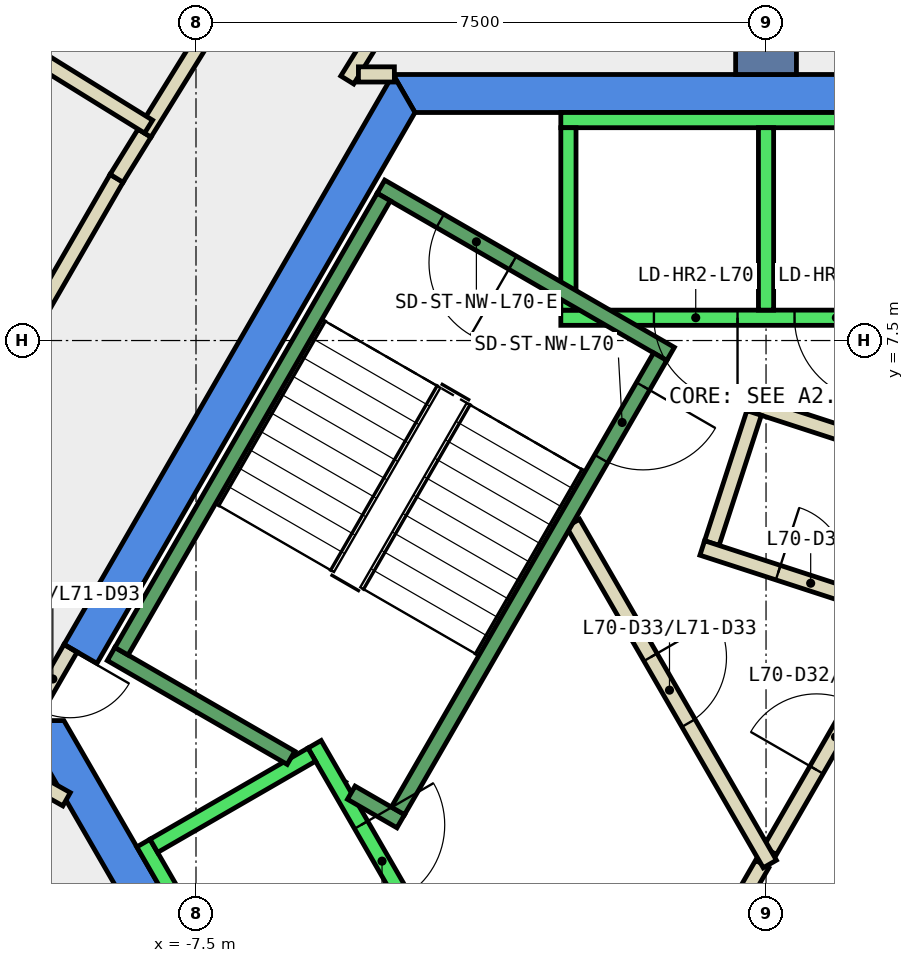
"""IFC4 building model, lengths in metres.
Left out: names, types, materials, properties, quantities, classifications, styles, units other than length and angle.
Written with IfcOpenShell. Run it as: python <this file> out.ifc"""

import sys

from ifc_helpers import new_model, si_unit, direction, frame, frame_2d, origin, place, context, subcontext, project, spatial, polyline, rectangle, outline, extrude, element, fill, save


model = new_model("IFC4")
c1 = context("Model", 3, precision=1e-05, world=origin(), true_north=direction((0.0, 1.0)))
c2 = subcontext(c1, "Body", "Model", "MODEL_VIEW")
j1 = project(units=[si_unit("LENGTHUNIT", "METRE"), si_unit("PLANEANGLEUNIT", "RADIAN")], contexts=[c1])
p1 = place(None, origin())
s1 = spatial("IfcSite", under=j1, at=p1, CompositionType="ELEMENT")
p2 = place(p1, origin())
s2 = spatial("IfcBuilding", under=s1, at=p2, CompositionType="ELEMENT")
p3 = place(p2, frame((0.0, 0.0, 300.8)))
s3 = spatial("IfcBuildingStorey", under=s2, at=p3, CompositionType="ELEMENT", Elevation=300.8)
p4 = place(p3, frame((0.0, 0.0, -0.34)))
e1 = element("IfcWall", 1, at=p4, inside=s3, PredefinedType="SHEAR", context=c2, shape_type="SweptSolid", body=[
    extrude(outline(polyline([(4.907, 11.0), (-4.907, 11.0), (-4.619, 10.5), (4.619, 10.5), (4.907, 11.0)])), origin(), (0.0, 0.0, 1.0), 3.6),
])
p5 = place(p3, frame((0.0, 0.0, -0.34)))
e2 = element("IfcWall", 2, at=p5, inside=s3, PredefinedType="SHEAR", context=c2, shape_type="SweptSolid", body=[
    extrude(outline(polyline([(-9.236, 3.502), (-8.803, 3.253), (-4.619, 10.5), (-4.907, 11.0), (-9.236, 3.502)])), origin(), (0.0, 0.0, 1.0), 3.6),
])
p6 = place(p3, frame((0.0, 0.0, -0.34)))
e3 = element("IfcWall", 3, at=p6, inside=s3, PredefinedType="SHEAR", context=c2, shape_type="SweptSolid", body=[
    extrude(outline(polyline([(-9.815, 2.5), (-4.907, -6.0), (-4.619, -5.5), (-9.238, 2.5), (-9.815, 2.5)])), origin(), (0.0, 0.0, 1.0), 3.6),
])
p7 = place(p3, frame((0.0, 11.0, -0.34), z_axis=(0.0, 0.0, 1.0), x_axis=(0.0, 1.0, 0.0)))
e4 = element("IfcWall", 4, at=p7, inside=s3, PredefinedType="SHEAR", context=c2, shape_type="SweptSolid", body=[
    extrude(rectangle(XDim=9.0, YDim=0.8, at=frame_2d((4.5, 0.0))), origin(), (0.0, 0.0, 1.0), 3.6),
])
p8 = place(p3, frame((2.06, 5.931, 0.0), z_axis=(0.0, 0.0, 1.0), x_axis=(-0.95092855133, 0.309410552932, 0.0)))
e5 = element("IfcWall", 5, at=p8, inside=s3, PredefinedType="PARTITIONING", context=c2, shape_type="SweptSolid", body=[
    extrude(rectangle(XDim=2.399, YDim=0.2, at=frame_2d((1.199, 0.0))), origin(), (0.0, 0.0, 1.0), 3.26),
])
p9 = place(p3, frame((-0.157, 6.547, 0.0), z_axis=(0.0, 0.0, 1.0), x_axis=(-0.308813127339, -0.951122732555, 0.0)))
e6 = element("IfcWall", 6, at=p9, inside=s3, PredefinedType="PARTITIONING", context=c2, shape_type="SweptSolid", body=[
    extrude(rectangle(XDim=1.8, YDim=0.2, at=frame_2d((0.9, 0.0))), origin(), (0.0, 0.0, 1.0), 3.26),
])
p10 = place(p3, frame((-0.839, 4.771, 0.0), z_axis=(0.0, 0.0, 1.0), x_axis=(0.950961084355, -0.309310549515, 0.0)))
e7 = element("IfcWall", 7, at=p10, inside=s3, PredefinedType="PARTITIONING", context=c2, shape_type="SweptSolid", body=[
    extrude(rectangle(XDim=3.0, YDim=0.2, at=frame_2d((1.5, 0.0))), origin(), (0.0, 0.0, 1.0), 3.26),
])
p11 = place(p10, frame((1.05, 0.0, 0.0)))
e8 = element("IfcOpeningElement", 8, at=p11, cuts=e7, PredefinedType="OPENING", context=c2, shape_type="SweptSolid", body=[
    extrude(rectangle(XDim=0.9, YDim=2.1, at=frame_2d((0.45, 1.05))), frame((0.0, 0.11, 0.0), z_axis=(0.0, -1.0, 0.0), x_axis=(1.0, 0.0, 0.0)), (0.0, 0.0, 1.0), 0.22),
])
p12 = place(p3, frame((-2.969, 15.033, 0.0), z_axis=(0.0, 0.0, 1.0), x_axis=(-0.526330241425, -0.85028023437, 0.0)))
e9 = element("IfcWall", 9, at=p12, inside=s3, PredefinedType="PARTITIONING", context=c2, shape_type="SweptSolid", body=[
    extrude(rectangle(XDim=4.828, YDim=0.2, at=frame_2d((2.414, 0.0))), origin(), (0.0, 0.0, 1.0), 3.26),
])
p13 = place(p12, frame((1.514, 0.0, 0.0)))
e10 = element("IfcOpeningElement", 10, at=p13, cuts=e9, PredefinedType="OPENING", context=c2, shape_type="SweptSolid", body=[
    extrude(rectangle(XDim=1.8, YDim=2.1, at=frame_2d((0.9, 1.05))), frame((0.0, 0.11, 0.0), z_axis=(0.0, -1.0, 0.0), x_axis=(1.0, 0.0, 0.0)), (0.0, 0.0, 1.0), 0.22),
])
p14 = place(p3, frame((-5.363, 11.001, 0.0), z_axis=(0.0, 0.0, 1.0), x_axis=(1.0, 0.0, 0.0)))
e11 = element("IfcWall", 11, at=p14, inside=s3, PredefinedType="PARTITIONING", context=c2, shape_type="SweptSolid", body=[
    extrude(rectangle(XDim=0.473, YDim=0.2, at=frame_2d((0.237, 0.0))), origin(), (0.0, 0.0, 1.0), 3.26),
])
p15 = place(p3, frame((-9.203, 1.465, 0.0), z_axis=(0.0, 0.0, 1.0), x_axis=(-0.872243753731, 0.489071399775, 0.0)))
e12 = element("IfcWall", 12, at=p15, inside=s3, PredefinedType="PARTITIONING", context=c2, shape_type="SweptSolid", body=[
    extrude(rectangle(XDim=1.715, YDim=0.2, at=frame_2d((0.858, 0.0))), origin(), (0.0, 0.0, 1.0), 3.26),
])
p16 = place(p3, frame((-10.543, 6.174, 0.0), z_axis=(0.0, 0.0, 1.0), x_axis=(0.50008212199, 0.86597798544, 0.0)))
e13 = element("IfcWall", 13, at=p16, inside=s3, PredefinedType="PARTITIONING", context=c2, shape_type="SweptSolid", body=[
    extrude(rectangle(XDim=3.995, YDim=0.2, at=frame_2d((1.998, 0.0))), origin(), (0.0, 0.0, 1.0), 3.26),
])
p17 = place(p3, frame((-8.545, 9.634, 0.0), z_axis=(0.0, 0.0, 1.0), x_axis=(0.52594604986, 0.85051793199, 0.0)))
e14 = element("IfcWall", 14, at=p17, inside=s3, PredefinedType="PARTITIONING", context=c2, shape_type="SweptSolid", body=[
    extrude(rectangle(XDim=0.699, YDim=0.2, at=frame_2d((0.35, 0.0))), origin(), (0.0, 0.0, 1.0), 3.26),
])
p18 = place(p3, frame((-8.177, 10.229, 0.0), z_axis=(0.0, 0.0, 1.0), x_axis=(0.526504295939, 0.850172468595, 0.0)))
e15 = element("IfcWall", 15, at=p18, inside=s3, PredefinedType="PARTITIONING", context=c2, shape_type="SweptSolid", body=[
    extrude(rectangle(XDim=3.2, YDim=0.2, at=frame_2d((1.6, 0.0))), origin(), (0.0, 0.0, 1.0), 3.26),
])
p19 = place(p3, frame((-0.982, -1.0, 0.0), z_axis=(0.0, 0.0, 1.0), x_axis=(0.50024047865, 0.865886518847, 0.0)))
e16 = element("IfcWall", 16, at=p19, inside=s3, PredefinedType="PARTITIONING", context=c2, shape_type="SweptSolid", body=[
    extrude(rectangle(XDim=1.863, YDim=0.2, at=frame_2d((0.931, 0.0))), origin(), (0.0, 0.0, 1.0), 3.26),
])
p20 = place(p3, frame((0.05, 0.787, 0.0), z_axis=(0.0, 0.0, 1.0), x_axis=(0.499954076797, 0.866051915934, 0.0)))
e17 = element("IfcWall", 17, at=p20, inside=s3, PredefinedType="PARTITIONING", context=c2, shape_type="SweptSolid", body=[
    extrude(rectangle(XDim=3.558, YDim=0.2, at=frame_2d((1.779, 0.0))), origin(), (0.0, 0.0, 1.0), 3.26),
])
p21 = place(p20, frame((1.229, 0.0, 0.0)))
e18 = element("IfcOpeningElement", 18, at=p21, cuts=e17, PredefinedType="OPENING", context=c2, shape_type="SweptSolid", body=[
    extrude(rectangle(XDim=1.0, YDim=2.1, at=frame_2d((0.5, 1.05))), frame((0.0, 0.11, 0.0), z_axis=(0.0, -1.0, 0.0), x_axis=(1.0, 0.0, 0.0)), (0.0, 0.0, 1.0), 0.22),
])
p22 = place(p3, frame((-2.54, 5.1, 0.0), z_axis=(0.0, 0.0, 1.0), x_axis=(0.499925051871, -0.866068670783, 0.0)))
e19 = element("IfcWall", 19, at=p22, inside=s3, PredefinedType="PARTITIONING", context=c2, shape_type="SweptSolid", body=[
    extrude(rectangle(XDim=5.181, YDim=0.2, at=frame_2d((2.59, 0.0))), origin(), (0.0, 0.0, 1.0), 3.26),
])
p23 = place(p22, frame((2.04, 0.0, 0.0)))
e20 = element("IfcOpeningElement", 20, at=p23, cuts=e19, PredefinedType="OPENING", context=c2, shape_type="SweptSolid", body=[
    extrude(rectangle(XDim=1.0, YDim=2.1, at=frame_2d((0.5, 1.05))), frame((0.0, 0.11, 0.0), z_axis=(0.0, -1.0, 0.0), x_axis=(1.0, 0.0, 0.0)), (0.0, 0.0, 1.0), 0.22),
])
p24 = place(p3, frame((-10.42, 11.736, 0.0), z_axis=(0.0, 0.0, 1.0), x_axis=(0.850124477172, -0.52658178217, 0.0)))
e21 = element("IfcWall", 21, at=p24, inside=s3, PredefinedType="PARTITIONING", context=c2, shape_type="SweptSolid", body=[
    extrude(rectangle(XDim=2.701, YDim=0.2, at=frame_2d((1.35, 0.0))), origin(), (0.0, 0.0, 1.0), 3.26),
])
p25 = place(p3, frame((-9.15, 3.452, 0.0), z_axis=(0.0, 0.0, 1.0), x_axis=(-0.500079945886, -0.865979242085, 0.0)))
e22 = element("IfcWall", 22, at=p25, inside=s3, PredefinedType="PARTITIONING", context=c2, shape_type="SweptSolid", body=[
    extrude(rectangle(XDim=0.926, YDim=0.2, at=frame_2d((0.463, 0.0))), origin(), (0.0, 0.0, 1.0), 2.4),
])
p26 = place(p25, frame((0.017, 0.0, 0.0)))
e23 = element("IfcOpeningElement", 23, at=p26, cuts=e22, PredefinedType="OPENING", context=c2, shape_type="SweptSolid", body=[
    extrude(rectangle(XDim=0.9, YDim=2.1, at=frame_2d((0.45, 1.05))), frame((0.0, 0.11, 0.0), z_axis=(0.0, -1.0, 0.0), x_axis=(1.0, 0.0, 0.0)), (0.0, 0.0, 1.0), 0.22),
])
p27 = place(p3, frame((2.7, 7.8, 0.0), z_axis=(0.0, 0.0, 1.0), x_axis=(-1.0, 0.0, 0.0)))
e24 = element("IfcWall", 24, at=p27, inside=s3, PredefinedType="STANDARD", context=c2, shape_type="SweptSolid", body=[
    extrude(rectangle(XDim=5.4, YDim=0.2, at=frame_2d((2.7, 0.0))), origin(), (0.0, 0.0, 1.0), 3.26),
])
p28 = place(p27, frame((1.225, 0.0, 0.0)))
e25 = element("IfcOpeningElement", 25, at=p28, cuts=e24, PredefinedType="OPENING", context=c2, shape_type="SweptSolid", body=[
    extrude(rectangle(XDim=1.1, YDim=2.1, at=frame_2d((0.55, 1.05))), frame((0.0, 0.11, 0.0), z_axis=(0.0, -1.0, 0.0), x_axis=(1.0, 0.0, 0.0)), (0.0, 0.0, 1.0), 0.22),
])
p29 = place(p27, frame((3.075, 0.0, 0.0)))
e26 = element("IfcOpeningElement", 26, at=p29, cuts=e24, PredefinedType="OPENING", context=c2, shape_type="SweptSolid", body=[
    extrude(rectangle(XDim=1.1, YDim=2.1, at=frame_2d((0.55, 1.05))), frame((0.0, 0.11, 0.0), z_axis=(0.0, -1.0, 0.0), x_axis=(1.0, 0.0, 0.0)), (0.0, 0.0, 1.0), 0.22),
])
p30 = place(p3, frame((2.7, 10.4, 0.0), z_axis=(0.0, 0.0, 1.0), x_axis=(-1.0, 0.0, 0.0)))
e27 = element("IfcWall", 27, at=p30, inside=s3, PredefinedType="STANDARD", context=c2, shape_type="SweptSolid", body=[
    extrude(rectangle(XDim=5.4, YDim=0.2, at=frame_2d((2.7, 0.0))), origin(), (0.0, 0.0, 1.0), 3.26),
])
for number, where, z_axis, x_axis in (
    (28, (0.0, 7.9, 0.0), (0.0, 0.0, 1.0), (0.0, 1.0, 0.0)),
    (29, (-2.6, 7.9, 0.0), (0.0, 0.0, 1.0), (0.0, 1.0, 0.0)),
):
    element("IfcWall", number, at=place(p3, frame(where, z_axis=z_axis, x_axis=x_axis)), inside=s3, PredefinedType="STANDARD", context=c2, shape_type="SweptSolid", body=[
        extrude(rectangle(XDim=2.4, YDim=0.2, at=frame_2d((1.2, 0.0))), origin(), (0.0, 0.0, 1.0), 3.26),
    ])
p31 = place(p3, frame((-5.94, 2.188, 0.0), z_axis=(0.0, 0.0, 1.0), x_axis=(0.500034260056, -0.866005622828, 0.0)))
e30 = element("IfcWall", 30, at=p31, inside=s3, PredefinedType="STANDARD", context=c2, shape_type="SweptSolid", body=[
    extrude(rectangle(XDim=5.399, YDim=0.2, at=frame_2d((2.7, 0.0))), origin(), (0.0, 0.0, 1.0), 3.26),
])
p32 = place(p31, frame((3.075, 0.0, 0.0)))
e31 = element("IfcOpeningElement", 31, at=p32, cuts=e30, PredefinedType="OPENING", context=c2, shape_type="SweptSolid", body=[
    extrude(rectangle(XDim=1.1, YDim=2.1, at=frame_2d((0.55, 1.05))), frame((0.0, 0.11, 0.0), z_axis=(0.0, -1.0, 0.0), x_axis=(1.0, 0.0, 0.0)), (0.0, 0.0, 1.0), 0.22),
])
p33 = place(p31, frame((1.225, 0.0, 0.0)))
e32 = element("IfcOpeningElement", 32, at=p33, cuts=e30, PredefinedType="OPENING", context=c2, shape_type="SweptSolid", body=[
    extrude(rectangle(XDim=1.1, YDim=2.1, at=frame_2d((0.55, 1.05))), frame((0.0, 0.11, 0.0), z_axis=(0.0, -1.0, 0.0), x_axis=(1.0, 0.0, 0.0)), (0.0, 0.0, 1.0), 0.22),
])
p34 = place(p3, frame((-8.192, 0.888, 0.0), z_axis=(0.0, 0.0, 1.0), x_axis=(0.500034260056, -0.866005622828, 0.0)))
e33 = element("IfcWall", 33, at=p34, inside=s3, PredefinedType="STANDARD", context=c2, shape_type="SweptSolid", body=[
    extrude(rectangle(XDim=5.399, YDim=0.2, at=frame_2d((2.7, 0.0))), origin(), (0.0, 0.0, 1.0), 3.26),
])
p35 = place(p3, frame((-5.977, 2.052, 0.0), z_axis=(0.0, 0.0, 1.0), x_axis=(-0.865973769406, -0.500089422704, 0.0)))
e34 = element("IfcWall", 34, at=p35, inside=s3, PredefinedType="STANDARD", context=c2, shape_type="SweptSolid", body=[
    extrude(rectangle(XDim=2.399, YDim=0.2, at=frame_2d((1.2, 0.0))), origin(), (0.0, 0.0, 1.0), 3.26),
])
p36 = place(p3, frame((-1.256, 7.324, 0.0), z_axis=(0.0, 0.0, 1.0), x_axis=(-0.866046073146, 0.499964197906, 0.0)))
e35 = element("IfcWall", 35, at=p36, inside=s3, PredefinedType="STANDARD", context=c2, shape_type="SweptSolid", body=[
    extrude(rectangle(XDim=4.4, YDim=0.2, at=frame_2d((2.2, 0.0))), origin(), (0.0, 0.0, 1.0), 3.26),
])
p37 = place(p36, frame((2.4, 0.0, 0.0)))
e36 = element("IfcOpeningElement", 36, at=p37, cuts=e35, PredefinedType="OPENING", context=c2, shape_type="SweptSolid", body=[
    extrude(rectangle(XDim=1.1, YDim=2.2, at=frame_2d((0.55, 1.1))), frame((0.0, 0.11, 0.0), z_axis=(0.0, -1.0, 0.0), x_axis=(1.0, 0.0, 0.0)), (0.0, 0.0, 1.0), 0.22),
])
p38 = place(p3, frame((-6.25, 2.01, 0.0), z_axis=(0.0, 0.0, 1.0), x_axis=(-0.86611865017, 0.499838457731, 0.0)))
e37 = element("IfcWall", 37, at=p38, inside=s3, PredefinedType="STANDARD", context=c2, shape_type="SweptSolid", body=[
    extrude(rectangle(XDim=2.733, YDim=0.2, at=frame_2d((1.366, 0.0))), origin(), (0.0, 0.0, 1.0), 3.26),
])
p39 = place(p3, frame((-4.806, 1.176, 0.0), z_axis=(0.0, 0.0, 1.0), x_axis=(-0.866558586415, 0.499075361355, 0.0)))
e38 = element("IfcWall", 38, at=p39, inside=s3, PredefinedType="STANDARD", context=c2, shape_type="SweptSolid", body=[
    extrude(rectangle(XDim=0.751, YDim=0.2, at=frame_2d((0.376, 0.0))), origin(), (0.0, 0.0, 1.0), 3.26),
])
p40 = place(p3, frame((-1.393, 7.288, 0.0), z_axis=(0.0, 0.0, 1.0), x_axis=(-0.499963383562, -0.866046543262, 0.0)))
e39 = element("IfcWall", 39, at=p40, inside=s3, PredefinedType="STANDARD", context=c2, shape_type="SweptSolid", body=[
    extrude(rectangle(XDim=6.9, YDim=0.2, at=frame_2d((3.45, 0.0))), origin(), (0.0, 0.0, 1.0), 3.26),
])
p41 = place(p40, frame((0.45, 0.0, 0.0)))
e40 = element("IfcOpeningElement", 40, at=p41, cuts=e39, PredefinedType="OPENING", context=c2, shape_type="SweptSolid", body=[
    extrude(rectangle(XDim=1.1, YDim=2.2, at=frame_2d((0.55, 1.1))), frame((0.0, 0.11, 0.0), z_axis=(0.0, -1.0, 0.0), x_axis=(1.0, 0.0, 0.0)), (0.0, 0.0, 1.0), 0.22),
])
p42 = place(p3, frame((-5.03, 9.388, 0.0), z_axis=(0.0, 0.0, 1.0), x_axis=(-0.499978703459, -0.866037698999, 0.0)))
e41 = element("IfcWall", 41, at=p42, inside=s3, PredefinedType="STANDARD", context=c2, shape_type="SweptSolid", body=[
    extrude(rectangle(XDim=6.9, YDim=0.2, at=frame_2d((3.45, 0.0))), origin(), (0.0, 0.0, 1.0), 3.26),
])
p43 = place(p21, origin())
e42 = element("IfcDoor", 42, at=p43, inside=s3, OperationType="SINGLE_SWING_RIGHT", PredefinedType="DOOR", context=c2, shape_type="SweptSolid", body=[
    extrude(rectangle(XDim=1.0, YDim=2.1, at=frame_2d((0.5, 1.05))), frame((0.0, 0.025, 0.0), z_axis=(0.0, -1.0, 0.0), x_axis=(1.0, 0.0, 0.0)), (0.0, 0.0, 1.0), 0.05),
])
fill(e18, e42)
p44 = place(p23, origin())
e43 = element("IfcDoor", 43, at=p44, inside=s3, OperationType="SINGLE_SWING_RIGHT", PredefinedType="DOOR", context=c2, shape_type="SweptSolid", body=[
    extrude(rectangle(XDim=1.0, YDim=2.1, at=frame_2d((0.5, 1.05))), frame((0.0, 0.025, 0.0), z_axis=(0.0, -1.0, 0.0), x_axis=(1.0, 0.0, 0.0)), (0.0, 0.0, 1.0), 0.05),
])
fill(e20, e43)
p45 = place(p11, origin())
e44 = element("IfcDoor", 44, at=p45, inside=s3, OperationType="SINGLE_SWING_LEFT", PredefinedType="DOOR", context=c2, shape_type="SweptSolid", body=[
    extrude(rectangle(XDim=0.9, YDim=2.1, at=frame_2d((0.45, 1.05))), frame((0.0, 0.025, 0.0), z_axis=(0.0, -1.0, 0.0), x_axis=(1.0, 0.0, 0.0)), (0.0, 0.0, 1.0), 0.05),
])
fill(e8, e44)
p46 = place(p26, origin())
e45 = element("IfcDoor", 45, at=p46, inside=s3, OperationType="SINGLE_SWING_LEFT", PredefinedType="DOOR", context=c2, shape_type="SweptSolid", body=[
    extrude(rectangle(XDim=0.9, YDim=2.1, at=frame_2d((0.45, 1.05))), frame((0.0, 0.025, 0.0), z_axis=(0.0, -1.0, 0.0), x_axis=(1.0, 0.0, 0.0)), (0.0, 0.0, 1.0), 0.05),
])
fill(e23, e45)
p47 = place(p28, origin())
e46 = element("IfcDoor", 46, at=p47, inside=s3, OperationType="SLIDING_TO_LEFT", PredefinedType="DOOR", context=c2, shape_type="SweptSolid", body=[
    extrude(rectangle(XDim=1.1, YDim=2.1, at=frame_2d((0.55, 1.05))), frame((0.0, 0.025, 0.0), z_axis=(0.0, -1.0, 0.0), x_axis=(1.0, 0.0, 0.0)), (0.0, 0.0, 1.0), 0.05),
])
fill(e25, e46)
p48 = place(p29, origin())
e47 = element("IfcDoor", 47, at=p48, inside=s3, OperationType="SLIDING_TO_LEFT", PredefinedType="DOOR", context=c2, shape_type="SweptSolid", body=[
    extrude(rectangle(XDim=1.1, YDim=2.1, at=frame_2d((0.55, 1.05))), frame((0.0, 0.025, 0.0), z_axis=(0.0, -1.0, 0.0), x_axis=(1.0, 0.0, 0.0)), (0.0, 0.0, 1.0), 0.05),
])
fill(e26, e47)
p49 = place(p33, origin())
e48 = element("IfcDoor", 48, at=p49, inside=s3, OperationType="SLIDING_TO_LEFT", PredefinedType="DOOR", context=c2, shape_type="SweptSolid", body=[
    extrude(rectangle(XDim=1.1, YDim=2.1, at=frame_2d((0.55, 1.05))), frame((0.0, 0.025, 0.0), z_axis=(0.0, -1.0, 0.0), x_axis=(1.0, 0.0, 0.0)), (0.0, 0.0, 1.0), 0.05),
])
fill(e32, e48)
p50 = place(p41, origin())
e49 = element("IfcDoor", 49, at=p50, inside=s3, OperationType="SINGLE_SWING_LEFT", PredefinedType="DOOR", context=c2, shape_type="SweptSolid", body=[
    extrude(rectangle(XDim=1.1, YDim=2.2, at=frame_2d((0.55, 1.1))), frame((0.0, 0.025, 0.0), z_axis=(0.0, -1.0, 0.0), x_axis=(1.0, 0.0, 0.0)), (0.0, 0.0, 1.0), 0.05),
])
fill(e40, e49)
p51 = place(p37, origin())
e50 = element("IfcDoor", 50, at=p51, inside=s3, OperationType="SINGLE_SWING_LEFT", PredefinedType="DOOR", context=c2, shape_type="SweptSolid", body=[
    extrude(rectangle(XDim=1.1, YDim=2.2, at=frame_2d((0.55, 1.1))), frame((0.0, 0.025, 0.0), z_axis=(0.0, -1.0, 0.0), x_axis=(1.0, 0.0, 0.0)), (0.0, 0.0, 1.0), 0.05),
])
fill(e36, e50)
save(model, sys.argv[1])
